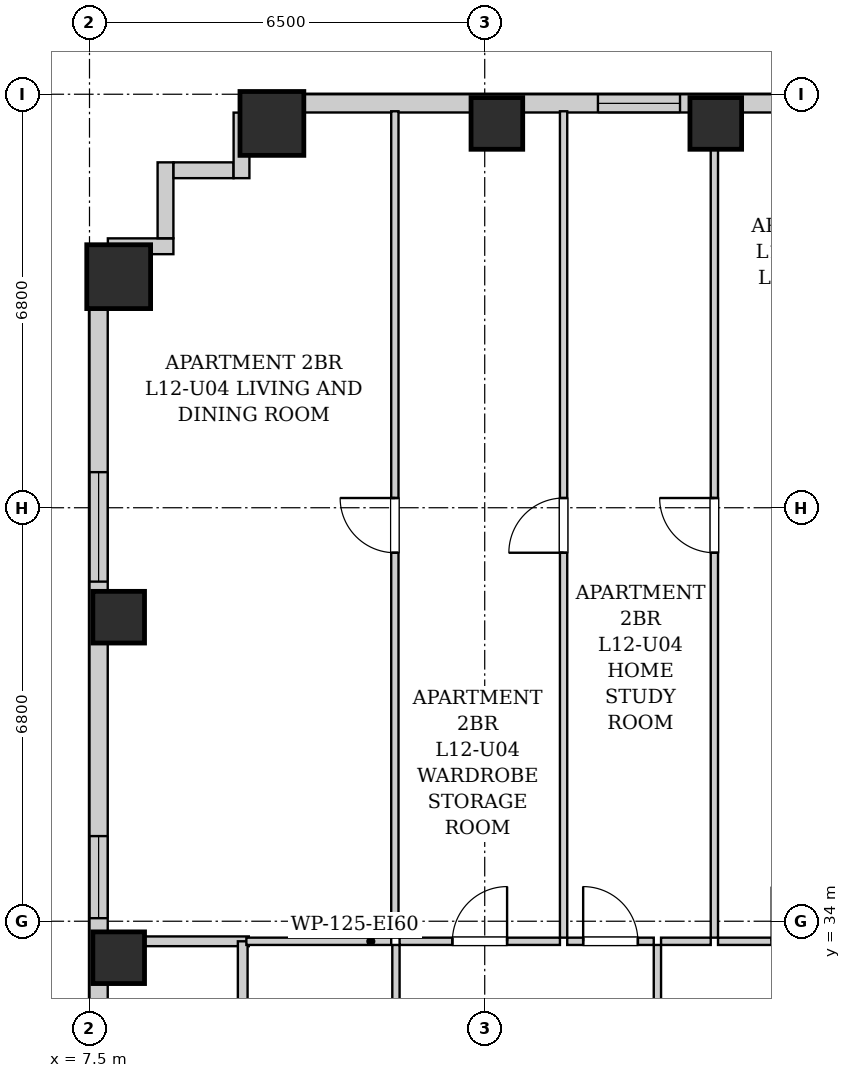
"""IFC4 building model, lengths in metres.
Left out: names, types, materials, properties, quantities, classifications, styles, units other than length and angle.
Written with IfcOpenShell. Run it as: python <this file> out.ifc"""

import sys

from ifc_helpers import new_model, si_unit, direction, frame, frame_2d, origin, origin_2d, place, context, subcontext, project, spatial, rectangle, extrude, element, fill, save


model = new_model("IFC4")
c1 = context("Model", 3, precision=1e-05, world=origin(), true_north=direction((0.0, 1.0)))
c2 = subcontext(c1, "Body", "Model", "MODEL_VIEW")
j1 = project(units=[si_unit("LENGTHUNIT", "METRE"), si_unit("PLANEANGLEUNIT", "RADIAN")], contexts=[c1])
p1 = place(None, origin())
s1 = spatial("IfcSite", under=j1, at=p1, CompositionType="ELEMENT")
p2 = place(p1, origin())
s2 = spatial("IfcBuilding", under=s1, at=p2, CompositionType="ELEMENT")
p3 = place(p2, frame((0.0, 0.0, 48.2)))
s3 = spatial("IfcBuildingStorey", under=s2, at=p3, CompositionType="ELEMENT", Elevation=48.2)
p4 = place(p3, frame((10.5, 47.12, 0.0), z_axis=(0.0, 0.0, 1.0), x_axis=(1.0, 0.0, 0.0)))
e1 = element("IfcColumn", 1, at=p4, inside=s3, PredefinedType="COLUMN", context=c2, shape_type="SweptSolid", body=[
    extrude(rectangle(XDim=1.05, YDim=1.05, at=origin_2d()), origin(), (0.0, 0.0, 1.0), 3.2),
])
for number, where, z_axis, x_axis in (
    (2, (14.2, 47.12, 0.0), (0.0, 0.0, 1.0), (1.0, 0.0, 0.0)),
    (3, (17.8, 47.12, 0.0), (0.0, 0.0, 1.0), (1.0, 0.0, 0.0)),
    (4, (7.98, 33.4, 0.0), (0.0, 0.0, 1.0), (1.0, 0.0, 0.0)),
    (5, (7.98, 39.0, 0.0), (0.0, 0.0, 1.0), (1.0, 0.0, 0.0)),
):
    element("IfcColumn", number, at=place(p3, frame(where, z_axis=z_axis, x_axis=x_axis)), inside=s3, PredefinedType="COLUMN", context=c2, shape_type="SweptSolid", body=[
        extrude(rectangle(XDim=0.85, YDim=0.85, at=origin_2d()), origin(), (0.0, 0.0, 1.0), 3.2),
    ])
p5 = place(p3, frame((7.98, 44.6, 0.0), z_axis=(0.0, 0.0, 1.0), x_axis=(1.0, 0.0, 0.0)))
e6 = element("IfcColumn", 6, at=p5, inside=s3, PredefinedType="COLUMN", context=c2, shape_type="SweptSolid", body=[
    extrude(rectangle(XDim=1.05, YDim=1.05, at=origin_2d()), origin(), (0.0, 0.0, 1.0), 3.2),
])
p6 = place(p3, frame((10.0, 47.45, 0.0), z_axis=(0.0, 0.0, 1.0), x_axis=(1.0, 0.0, 0.0)))
e7 = element("IfcWall", 7, at=p6, inside=s3, PredefinedType="SOLIDWALL", context=c2, shape_type="SweptSolid", body=[
    extrude(rectangle(XDim=26.15, YDim=0.3, at=frame_2d((13.075, 0.0))), origin(), (0.0, 0.0, 1.0), 1.975),
])
p7 = place(p6, frame((5.862, 0.0, 0.55)))
e8 = element("IfcOpeningElement", 8, at=p7, cuts=e7, PredefinedType="OPENING", context=c2, shape_type="SweptSolid", body=[
    extrude(rectangle(XDim=1.35, YDim=1.2, at=frame_2d((0.675, 0.6))), frame((0.0, 0.16, 0.0), z_axis=(0.0, -1.0, 0.0), x_axis=(1.0, 0.0, 0.0)), (0.0, 0.0, 1.0), 0.32),
])
p8 = place(p6, frame((8.944, 0.0, 0.55)))
e9 = element("IfcOpeningElement", 9, at=p8, cuts=e7, PredefinedType="OPENING", context=c2, shape_type="SweptSolid", body=[
    extrude(rectangle(XDim=1.8, YDim=1.2, at=frame_2d((0.9, 0.6))), frame((0.0, 0.16, 0.0), z_axis=(0.0, -1.0, 0.0), x_axis=(1.0, 0.0, 0.0)), (0.0, 0.0, 1.0), 0.32),
])
p9 = place(p6, frame((18.788, 0.0, 0.55)))
e10 = element("IfcOpeningElement", 10, at=p9, cuts=e7, PredefinedType="OPENING", context=c2, shape_type="SweptSolid", body=[
    extrude(rectangle(XDim=1.8, YDim=1.2, at=frame_2d((0.9, 0.6))), frame((0.0, 0.16, 0.0), z_axis=(0.0, -1.0, 0.0), x_axis=(1.0, 0.0, 0.0)), (0.0, 0.0, 1.0), 0.32),
])
p10 = place(p6, frame((21.265, 0.0, 0.55)))
e11 = element("IfcOpeningElement", 11, at=p10, cuts=e7, PredefinedType="OPENING", context=c2, shape_type="SweptSolid", body=[
    extrude(rectangle(XDim=1.35, YDim=1.2, at=frame_2d((0.675, 0.6))), frame((0.0, 0.16, 0.0), z_axis=(0.0, -1.0, 0.0), x_axis=(1.0, 0.0, 0.0)), (0.0, 0.0, 1.0), 0.32),
])
p11 = place(p6, frame((23.785, 0.0, 0.55)))
e12 = element("IfcOpeningElement", 12, at=p11, cuts=e7, PredefinedType="OPENING", context=c2, shape_type="SweptSolid", body=[
    extrude(rectangle(XDim=1.8, YDim=1.2, at=frame_2d((0.9, 0.6))), frame((0.0, 0.16, 0.0), z_axis=(0.0, -1.0, 0.0), x_axis=(1.0, 0.0, 0.0)), (0.0, 0.0, 1.0), 0.32),
])
p12 = place(p3, frame((7.65, 2.5, 0.0), z_axis=(0.0, 0.0, 1.0), x_axis=(0.0, 1.0, 0.0)))
e13 = element("IfcWall", 13, at=p12, inside=s3, PredefinedType="SOLIDWALL", context=c2, shape_type="SweptSolid", body=[
    extrude(rectangle(XDim=42.6, YDim=0.3, at=frame_2d((21.3, 0.0))), origin(), (0.0, 0.0, 1.0), 1.975),
])
p13 = place(p12, frame((3.15, 0.0, 0.55)))
e14 = element("IfcOpeningElement", 14, at=p13, cuts=e13, PredefinedType="OPENING", context=c2, shape_type="SweptSolid", body=[
    extrude(rectangle(XDim=1.8, YDim=1.2, at=frame_2d((0.9, 0.6))), frame((0.0, 0.16, 0.0), z_axis=(0.0, -1.0, 0.0), x_axis=(1.0, 0.0, 0.0)), (0.0, 0.0, 1.0), 0.32),
])
p14 = place(p12, frame((1.185, 0.0, 0.55)))
e15 = element("IfcOpeningElement", 15, at=p14, cuts=e13, PredefinedType="OPENING", context=c2, shape_type="SweptSolid", body=[
    extrude(rectangle(XDim=1.35, YDim=1.2, at=frame_2d((0.675, 0.6))), frame((0.0, 0.16, 0.0), z_axis=(0.0, -1.0, 0.0), x_axis=(1.0, 0.0, 0.0)), (0.0, 0.0, 1.0), 0.32),
])
p15 = place(p12, frame((37.085, 0.0, 0.55)))
e16 = element("IfcOpeningElement", 16, at=p15, cuts=e13, PredefinedType="OPENING", context=c2, shape_type="SweptSolid", body=[
    extrude(rectangle(XDim=1.8, YDim=1.2, at=frame_2d((0.9, 0.6))), frame((0.0, 0.16, 0.0), z_axis=(0.0, -1.0, 0.0), x_axis=(1.0, 0.0, 0.0)), (0.0, 0.0, 1.0), 0.32),
])
p16 = place(p12, frame((31.55, 0.0, 0.55)))
e17 = element("IfcOpeningElement", 17, at=p16, cuts=e13, PredefinedType="OPENING", context=c2, shape_type="SweptSolid", body=[
    extrude(rectangle(XDim=1.35, YDim=1.2, at=frame_2d((0.675, 0.6))), frame((0.0, 0.16, 0.0), z_axis=(0.0, -1.0, 0.0), x_axis=(1.0, 0.0, 0.0)), (0.0, 0.0, 1.0), 0.32),
])
p17 = place(p12, frame((13.95, 0.0, 0.55)))
e18 = element("IfcOpeningElement", 18, at=p17, cuts=e13, PredefinedType="OPENING", context=c2, shape_type="SweptSolid", body=[
    extrude(rectangle(XDim=1.8, YDim=1.2, at=frame_2d((0.9, 0.6))), frame((0.0, 0.16, 0.0), z_axis=(0.0, -1.0, 0.0), x_axis=(1.0, 0.0, 0.0)), (0.0, 0.0, 1.0), 0.32),
])
p18 = place(p12, frame((23.325, 0.0, 0.55)))
e19 = element("IfcOpeningElement", 19, at=p18, cuts=e13, PredefinedType="OPENING", context=c2, shape_type="SweptSolid", body=[
    extrude(rectangle(XDim=1.8, YDim=1.2, at=frame_2d((0.9, 0.6))), frame((0.0, 0.16, 0.0), z_axis=(0.0, -1.0, 0.0), x_axis=(1.0, 0.0, 0.0)), (0.0, 0.0, 1.0), 0.32),
])
p19 = place(p3, frame((7.802, 45.1, 0.0), z_axis=(0.0, 0.0, 1.0), x_axis=(1.0, 0.0, 0.0)))
e20 = element("IfcWall", 20, at=p19, inside=s3, PredefinedType="SOLIDWALL", context=c2, shape_type="SweptSolid", body=[
    extrude(rectangle(XDim=1.078, YDim=0.26, at=frame_2d((0.539, 0.0))), origin(), (0.0, 0.0, 1.0), 2.94),
])
p20 = place(p3, frame((8.75, 45.232, 0.0), z_axis=(0.0, 0.0, 1.0), x_axis=(0.0, 1.0, 0.0)))
e21 = element("IfcWall", 21, at=p20, inside=s3, PredefinedType="SOLIDWALL", context=c2, shape_type="SweptSolid", body=[
    extrude(rectangle(XDim=1.248, YDim=0.26, at=frame_2d((0.624, 0.0))), origin(), (0.0, 0.0, 1.0), 2.94),
])
p21 = place(p3, frame((8.882, 46.35, 0.0), z_axis=(0.0, 0.0, 1.0), x_axis=(1.0, 0.0, 0.0)))
e22 = element("IfcWall", 22, at=p21, inside=s3, PredefinedType="SOLIDWALL", context=c2, shape_type="SweptSolid", body=[
    extrude(rectangle(XDim=0.986, YDim=0.26, at=frame_2d((0.493, 0.0))), origin(), (0.0, 0.0, 1.0), 2.94),
])
p22 = place(p3, frame((10.0, 46.22, 0.0), z_axis=(0.0, 0.0, 1.0), x_axis=(0.0, 1.0, 0.0)))
e23 = element("IfcWall", 23, at=p22, inside=s3, PredefinedType="SOLIDWALL", context=c2, shape_type="SweptSolid", body=[
    extrude(rectangle(XDim=1.078, YDim=0.26, at=frame_2d((0.539, 0.0))), origin(), (0.0, 0.0, 1.0), 2.94),
])
p23 = place(p3, frame((7.78, 33.67, 0.0), z_axis=(0.0, 0.0, 1.0), x_axis=(1.0, 0.0, 0.0)))
e24 = element("IfcWall", 24, at=p23, inside=s3, PredefinedType="PARTITIONING", context=c2, shape_type="SweptSolid", body=[
    extrude(rectangle(XDim=2.34, YDim=0.16, at=frame_2d((1.17, 0.0))), origin(), (0.0, 0.0, 1.0), 2.94),
])
p24 = place(p3, frame((10.02, 30.76, 0.0), z_axis=(0.0, 0.0, 1.0), x_axis=(0.0, 1.0, 0.0)))
e25 = element("IfcWall", 25, at=p24, inside=s3, PredefinedType="PARTITIONING", context=c2, shape_type="SweptSolid", body=[
    extrude(rectangle(XDim=2.91, YDim=0.16, at=frame_2d((1.455, 0.0))), origin(), (0.0, 0.0, 1.0), 2.94),
])
p25 = place(p3, frame((12.54, 30.76, 0.0), z_axis=(0.0, 0.0, 1.0), x_axis=(0.0, 1.0, 0.0)))
e26 = element("IfcWall", 26, at=p25, inside=s3, PredefinedType="PARTITIONING", context=c2, shape_type="SweptSolid", body=[
    extrude(rectangle(XDim=2.85, YDim=0.12, at=frame_2d((1.425, 0.0))), origin(), (0.0, 0.0, 1.0), 2.94),
])
p26 = place(p25, frame((0.995, 0.0, 0.0)))
e27 = element("IfcOpeningElement", 27, at=p26, cuts=e26, PredefinedType="OPENING", context=c2, shape_type="SweptSolid", body=[
    extrude(rectangle(XDim=0.86, YDim=2.05, at=frame_2d((0.43, 1.025))), frame((0.0, 0.07, 0.0), z_axis=(0.0, -1.0, 0.0), x_axis=(1.0, 0.0, 0.0)), (0.0, 0.0, 1.0), 0.14),
])
p27 = place(p3, frame((10.08, 33.67, 0.0), z_axis=(0.0, 0.0, 1.0), x_axis=(1.0, 0.0, 0.0)))
e28 = element("IfcWall", 28, at=p27, inside=s3, PredefinedType="PARTITIONING", context=c2, shape_type="SweptSolid", body=[
    extrude(rectangle(XDim=2.382, YDim=0.12, at=frame_2d((1.191, 0.0))), origin(), (0.0, 0.0, 1.0), 2.94),
])
p28 = place(p3, frame((16.84, 30.76, 0.0), z_axis=(0.0, 0.0, 1.0), x_axis=(0.0, 1.0, 0.0)))
e29 = element("IfcWall", 29, at=p28, inside=s3, PredefinedType="PARTITIONING", context=c2, shape_type="SweptSolid", body=[
    extrude(rectangle(XDim=2.85, YDim=0.12, at=frame_2d((1.425, 0.0))), origin(), (0.0, 0.0, 1.0), 2.94),
])
p29 = place(p28, frame((0.975, 0.0, 0.0)))
e30 = element("IfcOpeningElement", 30, at=p29, cuts=e29, PredefinedType="OPENING", context=c2, shape_type="SweptSolid", body=[
    extrude(rectangle(XDim=0.9, YDim=2.05, at=frame_2d((0.45, 1.025))), frame((0.0, 0.07, 0.0), z_axis=(0.0, -1.0, 0.0), x_axis=(1.0, 0.0, 0.0)), (0.0, 0.0, 1.0), 0.14),
])
p30 = place(p3, frame((12.6, 33.67, 0.0), z_axis=(0.0, 0.0, 1.0), x_axis=(1.0, 0.0, 0.0)))
e31 = element("IfcWall", 31, at=p30, inside=s3, PredefinedType="PARTITIONING", context=c2, shape_type="SweptSolid", body=[
    extrude(rectangle(XDim=2.637, YDim=0.12, at=frame_2d((1.318, 0.0))), origin(), (0.0, 0.0, 1.0), 2.94),
])
p31 = place(p30, frame((0.868, 0.0, 0.0)))
e32 = element("IfcOpeningElement", 32, at=p31, cuts=e31, PredefinedType="OPENING", context=c2, shape_type="SweptSolid", body=[
    extrude(rectangle(XDim=0.9, YDim=2.05, at=frame_2d((0.45, 1.025))), frame((0.0, 0.07, 0.0), z_axis=(0.0, -1.0, 0.0), x_axis=(1.0, 0.0, 0.0)), (0.0, 0.0, 1.0), 0.14),
])
p32 = place(p3, frame((15.357, 33.67, 0.0), z_axis=(0.0, 0.0, 1.0), x_axis=(1.0, 0.0, 0.0)))
e33 = element("IfcWall", 33, at=p32, inside=s3, PredefinedType="PARTITIONING", context=c2, shape_type="SweptSolid", body=[
    extrude(rectangle(XDim=1.423, YDim=0.12, at=frame_2d((0.711, 0.0))), origin(), (0.0, 0.0, 1.0), 2.94),
])
p33 = place(p32, frame((0.262, 0.0, 0.0)))
e34 = element("IfcOpeningElement", 34, at=p33, cuts=e33, PredefinedType="OPENING", context=c2, shape_type="SweptSolid", body=[
    extrude(rectangle(XDim=0.9, YDim=2.05, at=frame_2d((0.45, 1.025))), frame((0.0, 0.07, 0.0), z_axis=(0.0, -1.0, 0.0), x_axis=(1.0, 0.0, 0.0)), (0.0, 0.0, 1.0), 0.14),
])
p34 = place(p3, frame((16.9, 33.67, 0.0), z_axis=(0.0, 0.0, 1.0), x_axis=(1.0, 0.0, 0.0)))
e35 = element("IfcWall", 35, at=p34, inside=s3, PredefinedType="PARTITIONING", context=c2, shape_type="SweptSolid", body=[
    extrude(rectangle(XDim=0.817, YDim=0.12, at=frame_2d((0.409, 0.0))), origin(), (0.0, 0.0, 1.0), 2.94),
])
p35 = place(p3, frame((17.837, 33.67, 0.0), z_axis=(0.0, 0.0, 1.0), x_axis=(1.0, 0.0, 0.0)))
e36 = element("IfcWall", 36, at=p35, inside=s3, PredefinedType="PARTITIONING", context=c2, shape_type="SweptSolid", body=[
    extrude(rectangle(XDim=2.663, YDim=0.12, at=frame_2d((1.332, 0.0))), origin(), (0.0, 0.0, 1.0), 2.94),
])
p36 = place(p35, frame((0.882, 0.0, 0.0)))
e37 = element("IfcOpeningElement", 37, at=p36, cuts=e36, PredefinedType="OPENING", context=c2, shape_type="SweptSolid", body=[
    extrude(rectangle(XDim=0.9, YDim=2.05, at=frame_2d((0.45, 1.025))), frame((0.0, 0.07, 0.0), z_axis=(0.0, -1.0, 0.0), x_axis=(1.0, 0.0, 0.0)), (0.0, 0.0, 1.0), 0.14),
])
p37 = place(p3, frame((12.522, 33.73, 0.0), z_axis=(0.0, 0.0, 1.0), x_axis=(0.0, 1.0, 0.0)))
e38 = element("IfcWall", 38, at=p37, inside=s3, PredefinedType="PARTITIONING", context=c2, shape_type="SweptSolid", body=[
    extrude(rectangle(XDim=13.59, YDim=0.12, at=frame_2d((6.795, 0.0))), origin(), (0.0, 0.0, 1.0), 2.94),
])
p38 = place(p37, frame((6.33, 0.0, 0.0)))
e39 = element("IfcOpeningElement", 39, at=p38, cuts=e38, PredefinedType="OPENING", context=c2, shape_type="SweptSolid", body=[
    extrude(rectangle(XDim=0.9, YDim=2.05, at=frame_2d((0.45, 1.025))), frame((0.0, 0.07, 0.0), z_axis=(0.0, -1.0, 0.0), x_axis=(1.0, 0.0, 0.0)), (0.0, 0.0, 1.0), 0.14),
])
p39 = place(p3, frame((15.297, 33.73, 0.0), z_axis=(0.0, 0.0, 1.0), x_axis=(0.0, 1.0, 0.0)))
e40 = element("IfcWall", 40, at=p39, inside=s3, PredefinedType="PARTITIONING", context=c2, shape_type="SweptSolid", body=[
    extrude(rectangle(XDim=13.59, YDim=0.12, at=frame_2d((6.795, 0.0))), origin(), (0.0, 0.0, 1.0), 2.94),
])
p40 = place(p39, frame((6.33, 0.0, 0.0)))
e41 = element("IfcOpeningElement", 41, at=p40, cuts=e40, PredefinedType="OPENING", context=c2, shape_type="SweptSolid", body=[
    extrude(rectangle(XDim=0.9, YDim=2.05, at=frame_2d((0.45, 1.025))), frame((0.0, 0.07, 0.0), z_axis=(0.0, -1.0, 0.0), x_axis=(1.0, 0.0, 0.0)), (0.0, 0.0, 1.0), 0.14),
])
p41 = place(p3, frame((17.777, 33.73, 0.0), z_axis=(0.0, 0.0, 1.0), x_axis=(0.0, 1.0, 0.0)))
e42 = element("IfcWall", 42, at=p41, inside=s3, PredefinedType="PARTITIONING", context=c2, shape_type="SweptSolid", body=[
    extrude(rectangle(XDim=13.59, YDim=0.12, at=frame_2d((6.795, 0.0))), origin(), (0.0, 0.0, 1.0), 2.232),
])
p42 = place(p41, frame((6.33, 0.0, 0.0)))
e43 = element("IfcOpeningElement", 43, at=p42, cuts=e42, PredefinedType="OPENING", context=c2, shape_type="SweptSolid", body=[
    extrude(rectangle(XDim=0.9, YDim=2.05, at=frame_2d((0.45, 1.025))), frame((0.0, 0.07, 0.0), z_axis=(0.0, -1.0, 0.0), x_axis=(1.0, 0.0, 0.0)), (0.0, 0.0, 1.0), 0.14),
])
p43 = place(p31, origin())
e44 = element("IfcDoor", 44, at=p43, inside=s3, OperationType="SINGLE_SWING_RIGHT", PredefinedType="DOOR", context=c2, shape_type="SweptSolid", body=[
    extrude(rectangle(XDim=0.9, YDim=2.05, at=frame_2d((0.45, 1.025))), frame((0.0, 0.025, 0.0), z_axis=(0.0, -1.0, 0.0), x_axis=(1.0, 0.0, 0.0)), (0.0, 0.0, 1.0), 0.05),
])
fill(e32, e44)
p44 = place(p33, origin())
e45 = element("IfcDoor", 45, at=p44, inside=s3, OperationType="SINGLE_SWING_LEFT", PredefinedType="DOOR", context=c2, shape_type="SweptSolid", body=[
    extrude(rectangle(XDim=0.9, YDim=2.05, at=frame_2d((0.45, 1.025))), frame((0.0, 0.025, 0.0), z_axis=(0.0, -1.0, 0.0), x_axis=(1.0, 0.0, 0.0)), (0.0, 0.0, 1.0), 0.05),
])
fill(e34, e45)
p45 = place(p38, origin())
e46 = element("IfcDoor", 46, at=p45, inside=s3, OperationType="SINGLE_SWING_RIGHT", PredefinedType="DOOR", context=c2, shape_type="SweptSolid", body=[
    extrude(rectangle(XDim=0.9, YDim=2.05, at=frame_2d((0.45, 1.025))), frame((0.0, 0.025, 0.0), z_axis=(0.0, -1.0, 0.0), x_axis=(1.0, 0.0, 0.0)), (0.0, 0.0, 1.0), 0.05),
])
fill(e39, e46)
p46 = place(p40, origin())
e47 = element("IfcDoor", 47, at=p46, inside=s3, OperationType="SINGLE_SWING_LEFT", PredefinedType="DOOR", context=c2, shape_type="SweptSolid", body=[
    extrude(rectangle(XDim=0.9, YDim=2.05, at=frame_2d((0.45, 1.025))), frame((0.0, 0.025, 0.0), z_axis=(0.0, -1.0, 0.0), x_axis=(1.0, 0.0, 0.0)), (0.0, 0.0, 1.0), 0.05),
])
fill(e41, e47)
p47 = place(p42, origin())
e48 = element("IfcDoor", 48, at=p47, inside=s3, OperationType="SINGLE_SWING_RIGHT", PredefinedType="DOOR", context=c2, shape_type="SweptSolid", body=[
    extrude(rectangle(XDim=0.9, YDim=2.05, at=frame_2d((0.45, 1.025))), frame((0.0, 0.025, 0.0), z_axis=(0.0, -1.0, 0.0), x_axis=(1.0, 0.0, 0.0)), (0.0, 0.0, 1.0), 0.05),
])
fill(e43, e48)
p48 = place(p15, origin())
e49 = element("IfcWindow", 49, at=p48, inside=s3, PartitioningType="DOUBLE_PANEL_VERTICAL", PredefinedType="WINDOW", context=c2, shape_type="SweptSolid", body=[
    extrude(rectangle(XDim=1.8, YDim=1.2, at=frame_2d((0.9, 0.6))), frame((0.0, 0.03, 0.0), z_axis=(0.0, -1.0, 0.0), x_axis=(1.0, 0.0, 0.0)), (0.0, 0.0, 1.0), 0.06),
])
fill(e16, e49)
p49 = place(p16, origin())
e50 = element("IfcWindow", 50, at=p49, inside=s3, PartitioningType="SINGLE_PANEL", PredefinedType="WINDOW", context=c2, shape_type="SweptSolid", body=[
    extrude(rectangle(XDim=1.35, YDim=1.2, at=frame_2d((0.675, 0.6))), frame((0.0, 0.03, 0.0), z_axis=(0.0, -1.0, 0.0), x_axis=(1.0, 0.0, 0.0)), (0.0, 0.0, 1.0), 0.06),
])
fill(e17, e50)
p50 = place(p7, origin())
e51 = element("IfcWindow", 51, at=p50, inside=s3, PartitioningType="SINGLE_PANEL", PredefinedType="WINDOW", context=c2, shape_type="SweptSolid", body=[
    extrude(rectangle(XDim=1.35, YDim=1.2, at=frame_2d((0.675, 0.6))), frame((0.0, 0.03, 0.0), z_axis=(0.0, -1.0, 0.0), x_axis=(1.0, 0.0, 0.0)), (0.0, 0.0, 1.0), 0.06),
])
fill(e8, e51)
save(model, sys.argv[1])
